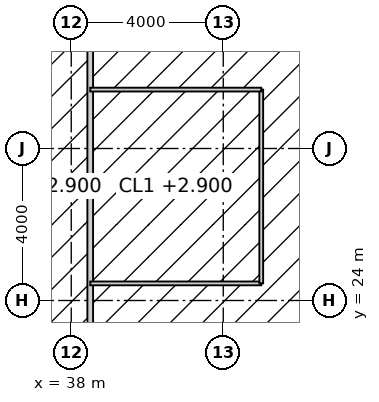
"""IFC4 building model, lengths in metres.
Left out: names, types, materials, properties, quantities, classifications, styles, units other than length and angle.
Written with IfcOpenShell. Run it as: python <this file> out.ifc"""

import sys

from ifc_helpers import new_model, si_unit, direction, frame, frame_2d, origin, place, context, subcontext, project, spatial, rectangle, extrude, element, fill, save


model = new_model("IFC4")
c1 = context("Model", 3, precision=1e-05, world=origin(), true_north=direction((0.0, 1.0)))
c2 = subcontext(c1, "Body", "Model", "MODEL_VIEW")
j1 = project(units=[si_unit("LENGTHUNIT", "METRE"), si_unit("PLANEANGLEUNIT", "RADIAN")], contexts=[c1])
p1 = place(None, origin())
s1 = spatial("IfcSite", under=j1, at=p1, CompositionType="ELEMENT")
p2 = place(p1, origin())
s2 = spatial("IfcBuilding", under=s1, at=p2, CompositionType="ELEMENT")
p3 = place(p2, frame((0.0, 0.0, 278.2)))
s3 = spatial("IfcBuildingStorey", under=s2, at=p3, CompositionType="ELEMENT", Elevation=278.2)
p4 = place(p3, frame((38.5, 15.625, 0.0), z_axis=(0.0, 0.0, 1.0), x_axis=(0.0, 1.0, 0.0)))
e1 = element("IfcWall", 1, at=p4, inside=s3, PredefinedType="PARTITIONING", context=c2, shape_type="SweptSolid", body=[
    extrude(rectangle(XDim=22.75, YDim=0.15, at=frame_2d((11.375, 0.0))), origin(), (0.0, 0.0, 1.0), 3.85),
])
p5 = place(p4, frame((10.475, 0.0, 0.0)))
e2 = element("IfcOpeningElement", 2, at=p5, cuts=e1, PredefinedType="OPENING", context=c2, shape_type="SweptSolid", body=[
    extrude(rectangle(XDim=1.8, YDim=2.4, at=frame_2d((0.9, 1.2))), frame((0.0, 0.085, 0.0), z_axis=(0.0, -1.0, 0.0), x_axis=(1.0, 0.0, 0.0)), (0.0, 0.0, 1.0), 0.17),
])
p6 = place(p3, frame((38.5, 24.45, 0.0), z_axis=(0.0, 0.0, 1.0), x_axis=(1.0, 0.0, 0.0)))
e3 = element("IfcWall", 3, at=p6, inside=s3, PredefinedType="PARTITIONING", context=c2, shape_type="SweptSolid", body=[
    extrude(rectangle(XDim=4.5, YDim=0.1, at=frame_2d((2.25, 0.0))), origin(), (0.0, 0.0, 1.0), 3.85),
])
p7 = place(p3, frame((43.0, 24.45, 0.0), z_axis=(0.0, 0.0, 1.0), x_axis=(0.0, 1.0, 0.0)))
e4 = element("IfcWall", 4, at=p7, inside=s3, PredefinedType="PARTITIONING", context=c2, shape_type="SweptSolid", body=[
    extrude(rectangle(XDim=5.1, YDim=0.1, at=frame_2d((2.55, 0.0))), origin(), (0.0, 0.0, 1.0), 3.85),
])
p8 = place(p7, frame((2.05, 0.0, 0.0)))
e5 = element("IfcOpeningElement", 5, at=p8, cuts=e4, PredefinedType="OPENING", context=c2, shape_type="SweptSolid", body=[
    extrude(rectangle(XDim=1.0, YDim=2.2, at=frame_2d((0.5, 1.1))), frame((0.0, 0.06, 0.0), z_axis=(0.0, -1.0, 0.0), x_axis=(1.0, 0.0, 0.0)), (0.0, 0.0, 1.0), 0.12),
])
p9 = place(p3, frame((43.0, 29.55, 0.0), z_axis=(0.0, 0.0, 1.0), x_axis=(-1.0, 0.0, 0.0)))
e6 = element("IfcWall", 6, at=p9, inside=s3, PredefinedType="PARTITIONING", context=c2, shape_type="SweptSolid", body=[
    extrude(rectangle(XDim=4.5, YDim=0.1, at=frame_2d((2.25, 0.0))), origin(), (0.0, 0.0, 1.0), 3.85),
])
p10 = place(p5, origin())
e7 = element("IfcDoor", 7, at=p10, inside=s3, OperationType="DOUBLE_DOOR_DOUBLE_SWING", PredefinedType="DOOR", context=c2, shape_type="SweptSolid", body=[
    extrude(rectangle(XDim=1.8, YDim=2.4, at=frame_2d((0.9, 1.2))), frame((0.0, 0.025, 0.0), z_axis=(0.0, -1.0, 0.0), x_axis=(1.0, 0.0, 0.0)), (0.0, 0.0, 1.0), 0.05),
])
fill(e2, e7)
p11 = place(p8, origin())
e8 = element("IfcDoor", 8, at=p11, inside=s3, OperationType="SINGLE_SWING_RIGHT", PredefinedType="DOOR", context=c2, shape_type="SweptSolid", body=[
    extrude(rectangle(XDim=1.0, YDim=2.2, at=frame_2d((0.5, 1.1))), frame((0.0, 0.025, 0.0), z_axis=(0.0, -1.0, 0.0), x_axis=(1.0, 0.0, 0.0)), (0.0, 0.0, 1.0), 0.05),
])
fill(e5, e8)
save(model, sys.argv[1])
